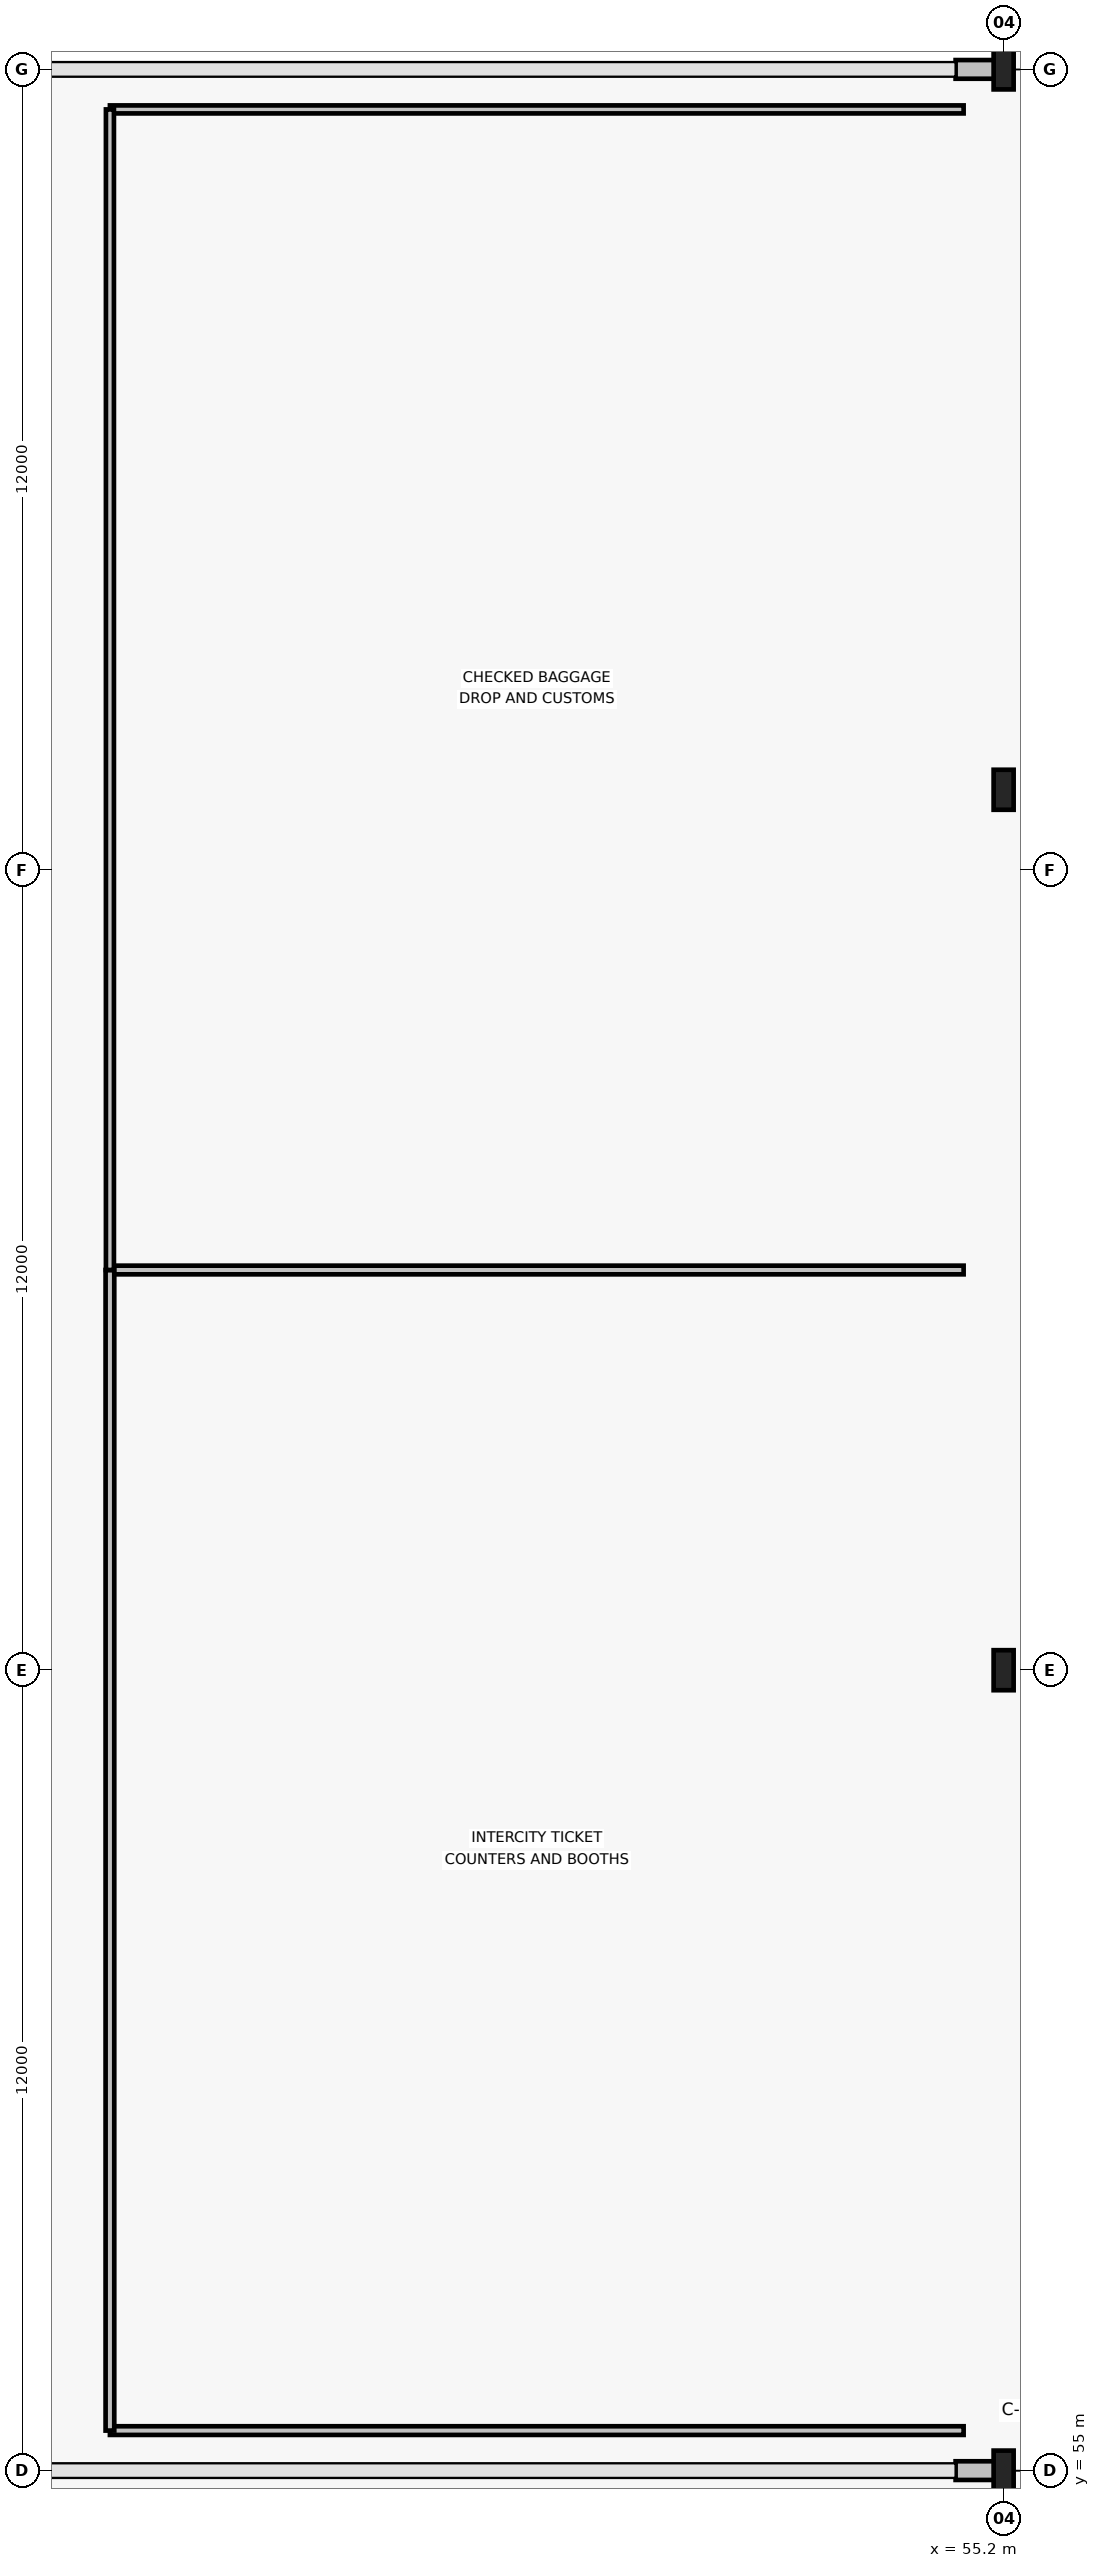
"""IFC4 building model, lengths in metres.
Left out: names, types, materials, properties, quantities, classifications, styles, units other than length and angle.
Written with IfcOpenShell. Run it as: python <this file> out.ifc"""

import sys

from ifc_helpers import new_model, si_unit, direction, frame, frame_2d, origin, origin_2d, place, context, subcontext, project, spatial, rectangle, i_section, extrude, element, save


model = new_model("IFC4")
c1 = context("Model", 3, precision=1e-05, world=origin(), true_north=direction((0.0, 1.0)))
c2 = subcontext(c1, "Body", "Model", "MODEL_VIEW")
j1 = project(units=[si_unit("LENGTHUNIT", "METRE"), si_unit("PLANEANGLEUNIT", "RADIAN")], contexts=[c1])
p1 = place(None, origin())
s1 = spatial("IfcSite", under=j1, at=p1, CompositionType="ELEMENT")
p2 = place(p1, origin())
s2 = spatial("IfcBuilding", under=s1, at=p2, CompositionType="ELEMENT")
p3 = place(p2, origin())
s3 = spatial("IfcBuildingStorey", under=s2, at=p3, CompositionType="ELEMENT", Elevation=0.0)
for number, where, z_axis, x_axis in (
    (1, (55.2, 55.0, 0.0), (0.0, 0.0, 1.0), (1.0, 0.0, 0.0)),
    (2, (55.2, 67.0, 0.0), (0.0, 0.0, 1.0), (1.0, 0.0, 0.0)),
    (3, (55.2, 80.2, 0.0), (0.0, 0.0, 1.0), (1.0, 0.0, 0.0)),
    (4, (55.2, 91.0, 0.0), (0.0, 0.0, 1.0), (1.0, 0.0, 0.0)),
):
    element("IfcColumn", number, at=place(p3, frame(where, z_axis=z_axis, x_axis=x_axis)), inside=s3, PredefinedType="COLUMN", context=c2, shape_type="SweptSolid", body=[
        extrude(i_section(OverallWidth=0.3, OverallDepth=0.6, WebThickness=0.015, FlangeThickness=0.03, FilletRadius=0.027, at=origin_2d()), origin(), (0.0, 0.0, 1.0), 5.4),
    ])
p4 = place(p3, frame((55.2, 54.14, 0.0), z_axis=(0.0, 0.0, 1.0), x_axis=(0.0, 1.0, 0.0)))
e5 = element("IfcWall", 5, at=p4, inside=s3, PredefinedType="STANDARD", context=c2, shape_type="SweptSolid", body=[
    extrude(rectangle(XDim=0.72, YDim=0.28, at=frame_2d((0.36, 0.0))), origin(), (0.0, 0.0, 1.0), 4.625),
])
for number, where, z_axis, x_axis in (
    (6, (54.48, 55.0, 0.0), (0.0, 0.0, 1.0), (1.0, 0.0, 0.0)),
    (7, (54.48, 91.0, 0.0), (0.0, 0.0, 1.0), (1.0, 0.0, 0.0)),
):
    element("IfcWall", number, at=place(p3, frame(where, z_axis=z_axis, x_axis=x_axis)), inside=s3, PredefinedType="STANDARD", context=c2, shape_type="SweptSolid", body=[
        extrude(rectangle(XDim=0.72, YDim=0.28, at=frame_2d((0.36, 0.0))), origin(), (0.0, 0.0, 1.0), 4.625),
    ])
p5 = place(p3, frame((55.2, 91.14, 0.0), z_axis=(0.0, 0.0, 1.0), x_axis=(0.0, 1.0, 0.0)))
e8 = element("IfcWall", 8, at=p5, inside=s3, PredefinedType="STANDARD", context=c2, shape_type="SweptSolid", body=[
    extrude(rectangle(XDim=5.66, YDim=0.28, at=frame_2d((2.83, 0.0))), origin(), (0.0, 0.0, 1.0), 4.625),
])
p6 = place(p3, frame((41.8, 55.6, 0.0), z_axis=(0.0, 0.0, 1.0), x_axis=(1.0, 0.0, 0.0)))
e9 = element("IfcWall", 9, at=p6, inside=s3, PredefinedType="PARTITIONING", context=c2, shape_type="SweptSolid", body=[
    extrude(rectangle(XDim=12.8, YDim=0.13, at=frame_2d((6.4, 0.0))), origin(), (0.0, 0.0, 1.0), 4.625),
])
p7 = place(p3, frame((54.6, 73.0, 0.0), z_axis=(0.0, 0.0, 1.0), x_axis=(-1.0, 0.0, 0.0)))
e10 = element("IfcWall", 10, at=p7, inside=s3, PredefinedType="PARTITIONING", context=c2, shape_type="SweptSolid", body=[
    extrude(rectangle(XDim=12.8, YDim=0.13, at=frame_2d((6.4, 0.0))), origin(), (0.0, 0.0, 1.0), 5.16),
])
p8 = place(p3, frame((41.8, 73.0, 0.0), z_axis=(0.0, 0.0, 1.0), x_axis=(0.0, -1.0, 0.0)))
e11 = element("IfcWall", 11, at=p8, inside=s3, PredefinedType="PARTITIONING", context=c2, shape_type="SweptSolid", body=[
    extrude(rectangle(XDim=17.4, YDim=0.13, at=frame_2d((8.7, 0.0))), origin(), (0.0, 0.0, 1.0), 5.16),
])
p9 = place(p3, frame((54.6, 90.4, 0.0), z_axis=(0.0, 0.0, 1.0), x_axis=(-1.0, 0.0, 0.0)))
e12 = element("IfcWall", 12, at=p9, inside=s3, PredefinedType="PARTITIONING", context=c2, shape_type="SweptSolid", body=[
    extrude(rectangle(XDim=12.8, YDim=0.12, at=frame_2d((6.4, 0.0))), origin(), (0.0, 0.0, 1.0), 4.625),
])
p10 = place(p3, frame((41.8, 90.4, 0.0), z_axis=(0.0, 0.0, 1.0), x_axis=(0.0, -1.0, 0.0)))
e13 = element("IfcWall", 13, at=p10, inside=s3, PredefinedType="PARTITIONING", context=c2, shape_type="SweptSolid", body=[
    extrude(rectangle(XDim=17.4, YDim=0.12, at=frame_2d((8.7, 0.0))), origin(), (0.0, 0.0, 1.0), 5.16),
])
save(model, sys.argv[1])
